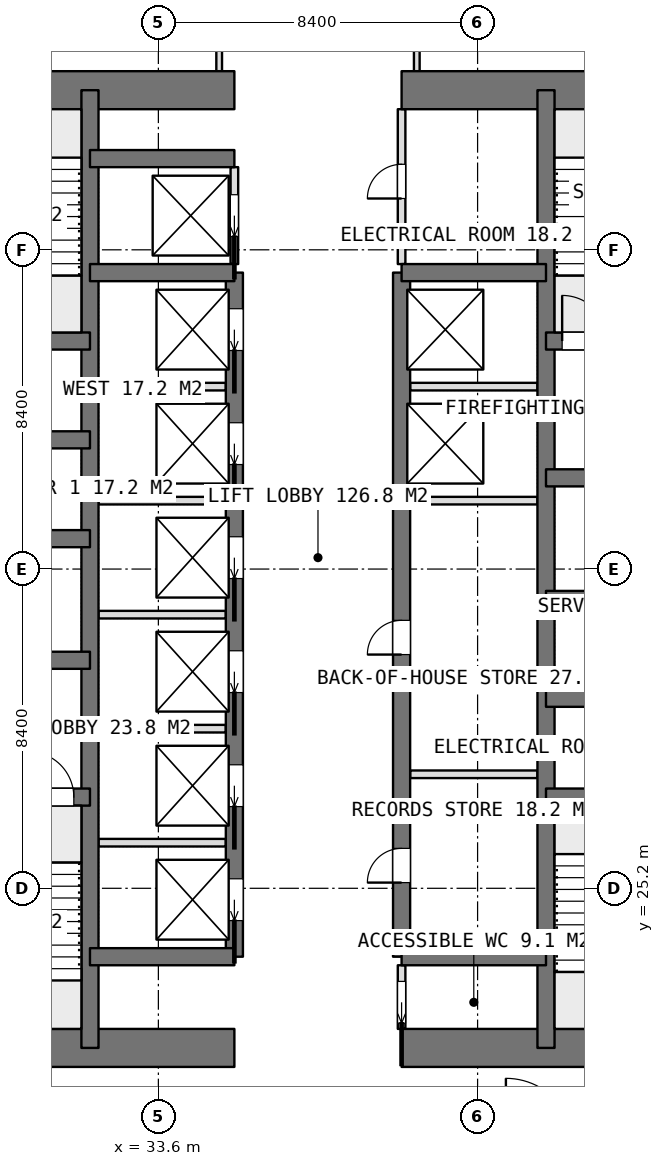
"""IFC4 building model, lengths in metres.
Left out: names, types, materials, properties, quantities, classifications, styles, units other than length and angle.
Written with IfcOpenShell. Run it as: python <this file> out.ifc"""

import sys

from ifc_helpers import new_model, si_unit, direction, frame, frame_2d, origin, place, context, subcontext, project, spatial, rectangle, extrude, element, fill, save


model = new_model("IFC4")
c1 = context("Model", 3, precision=1e-05, world=origin(), true_north=direction((0.0, 1.0)))
c2 = subcontext(c1, "Body", "Model", "MODEL_VIEW")
j1 = project(units=[si_unit("LENGTHUNIT", "METRE"), si_unit("PLANEANGLEUNIT", "RADIAN")], contexts=[c1])
p1 = place(None, origin())
s1 = spatial("IfcSite", under=j1, at=p1, CompositionType="ELEMENT")
p2 = place(p1, origin())
s2 = spatial("IfcBuilding", under=s1, at=p2, CompositionType="ELEMENT")
p3 = place(p2, frame((0.0, 0.0, 217.7)))
s3 = spatial("IfcBuildingStorey", under=s2, at=p3, CompositionType="ELEMENT", Elevation=217.7)
p4 = place(p3, frame((25.2, 21.0, 0.0), z_axis=(0.0, 0.0, 1.0), x_axis=(1.0, 0.0, 0.0)))
e1 = element("IfcWall", 1, at=p4, inside=s3, PredefinedType="SHEAR", context=c2, shape_type="SweptSolid", body=[
    extrude(rectangle(XDim=10.4, YDim=1.0, at=frame_2d((5.2, 0.0))), origin(), (0.0, 0.0, 1.0), 3.75),
])
p5 = place(p3, frame((40.0, 21.0, 0.0), z_axis=(0.0, 0.0, 1.0), x_axis=(1.0, 0.0, 0.0)))
e2 = element("IfcWall", 2, at=p5, inside=s3, PredefinedType="SHEAR", context=c2, shape_type="SweptSolid", body=[
    extrude(rectangle(XDim=10.4, YDim=1.0, at=frame_2d((5.2, 0.0))), origin(), (0.0, 0.0, 1.0), 3.75),
])
p6 = place(p3, frame((25.2, 46.2, 0.0), z_axis=(0.0, 0.0, 1.0), x_axis=(1.0, 0.0, 0.0)))
e3 = element("IfcWall", 3, at=p6, inside=s3, PredefinedType="SHEAR", context=c2, shape_type="SweptSolid", body=[
    extrude(rectangle(XDim=10.4, YDim=1.0, at=frame_2d((5.2, 0.0))), origin(), (0.0, 0.0, 1.0), 3.75),
])
p7 = place(p3, frame((40.0, 46.2, 0.0), z_axis=(0.0, 0.0, 1.0), x_axis=(1.0, 0.0, 0.0)))
e4 = element("IfcWall", 4, at=p7, inside=s3, PredefinedType="SHEAR", context=c2, shape_type="SweptSolid", body=[
    extrude(rectangle(XDim=10.4, YDim=1.0, at=frame_2d((5.2, 0.0))), origin(), (0.0, 0.0, 1.0), 3.75),
])
for number, where, z_axis, x_axis in (
    (5, (31.8, 21.0, 0.0), (0.0, 0.0, 1.0), (0.0, 1.0, 0.0)),
    (6, (43.8, 21.0, 0.0), (0.0, 0.0, 1.0), (0.0, 1.0, 0.0)),
):
    element("IfcWall", number, at=place(p3, frame(where, z_axis=z_axis, x_axis=x_axis)), inside=s3, PredefinedType="SHEAR", context=c2, shape_type="SweptSolid", body=[
        extrude(rectangle(XDim=25.2, YDim=0.45, at=frame_2d((12.6, 0.0))), origin(), (0.0, 0.0, 1.0), 3.75),
    ])
p8 = place(p3, frame((35.6, 23.4, 0.0), z_axis=(0.0, 0.0, 1.0), x_axis=(0.0, 1.0, 0.0)))
e7 = element("IfcWall", 7, at=p8, inside=s3, PredefinedType="SHEAR", context=c2, shape_type="SweptSolid", body=[
    extrude(rectangle(XDim=18.0, YDim=0.45, at=frame_2d((9.0, 0.0))), origin(), (0.0, 0.0, 1.0), 3.75),
])
p9 = place(p8, frame((0.95, 0.0, 0.0)))
e8 = element("IfcOpeningElement", 8, at=p9, cuts=e7, PredefinedType="OPENING", context=c2, shape_type="SweptSolid", body=[
    extrude(rectangle(XDim=1.1, YDim=2.1, at=frame_2d((0.55, 1.05))), frame((0.0, 0.235, 0.0), z_axis=(0.0, -1.0, 0.0), x_axis=(1.0, 0.0, 0.0)), (0.0, 0.0, 1.0), 0.47),
])
p10 = place(p8, frame((3.95, 0.0, 0.0)))
e9 = element("IfcOpeningElement", 9, at=p10, cuts=e7, PredefinedType="OPENING", context=c2, shape_type="SweptSolid", body=[
    extrude(rectangle(XDim=1.1, YDim=2.1, at=frame_2d((0.55, 1.05))), frame((0.0, 0.235, 0.0), z_axis=(0.0, -1.0, 0.0), x_axis=(1.0, 0.0, 0.0)), (0.0, 0.0, 1.0), 0.47),
])
p11 = place(p8, frame((6.95, 0.0, 0.0)))
e10 = element("IfcOpeningElement", 10, at=p11, cuts=e7, PredefinedType="OPENING", context=c2, shape_type="SweptSolid", body=[
    extrude(rectangle(XDim=1.1, YDim=2.1, at=frame_2d((0.55, 1.05))), frame((0.0, 0.235, 0.0), z_axis=(0.0, -1.0, 0.0), x_axis=(1.0, 0.0, 0.0)), (0.0, 0.0, 1.0), 0.47),
])
p12 = place(p8, frame((9.95, 0.0, 0.0)))
e11 = element("IfcOpeningElement", 11, at=p12, cuts=e7, PredefinedType="OPENING", context=c2, shape_type="SweptSolid", body=[
    extrude(rectangle(XDim=1.1, YDim=2.1, at=frame_2d((0.55, 1.05))), frame((0.0, 0.235, 0.0), z_axis=(0.0, -1.0, 0.0), x_axis=(1.0, 0.0, 0.0)), (0.0, 0.0, 1.0), 0.47),
])
p13 = place(p8, frame((12.95, 0.0, 0.0)))
e12 = element("IfcOpeningElement", 12, at=p13, cuts=e7, PredefinedType="OPENING", context=c2, shape_type="SweptSolid", body=[
    extrude(rectangle(XDim=1.1, YDim=2.1, at=frame_2d((0.55, 1.05))), frame((0.0, 0.235, 0.0), z_axis=(0.0, -1.0, 0.0), x_axis=(1.0, 0.0, 0.0)), (0.0, 0.0, 1.0), 0.47),
])
p14 = place(p8, frame((15.95, 0.0, 0.0)))
e13 = element("IfcOpeningElement", 13, at=p14, cuts=e7, PredefinedType="OPENING", context=c2, shape_type="SweptSolid", body=[
    extrude(rectangle(XDim=1.1, YDim=2.1, at=frame_2d((0.55, 1.05))), frame((0.0, 0.235, 0.0), z_axis=(0.0, -1.0, 0.0), x_axis=(1.0, 0.0, 0.0)), (0.0, 0.0, 1.0), 0.47),
])
p15 = place(p3, frame((40.0, 23.4, 0.0), z_axis=(0.0, 0.0, 1.0), x_axis=(0.0, 1.0, 0.0)))
e14 = element("IfcWall", 14, at=p15, inside=s3, PredefinedType="SHEAR", context=c2, shape_type="SweptSolid", body=[
    extrude(rectangle(XDim=18.0, YDim=0.45, at=frame_2d((9.0, 0.0))), origin(), (0.0, 0.0, 1.0), 3.75),
])
p16 = place(p15, frame((1.95, 0.0, 0.0)))
e15 = element("IfcOpeningElement", 15, at=p16, cuts=e14, PredefinedType="OPENING", context=c2, shape_type="SweptSolid", body=[
    extrude(rectangle(XDim=0.9, YDim=2.1, at=frame_2d((0.45, 1.05))), frame((0.0, 0.235, 0.0), z_axis=(0.0, -1.0, 0.0), x_axis=(1.0, 0.0, 0.0)), (0.0, 0.0, 1.0), 0.47),
])
p17 = place(p15, frame((7.95, 0.0, 0.0)))
e16 = element("IfcOpeningElement", 16, at=p17, cuts=e14, PredefinedType="OPENING", context=c2, shape_type="SweptSolid", body=[
    extrude(rectangle(XDim=0.9, YDim=2.1, at=frame_2d((0.45, 1.05))), frame((0.0, 0.235, 0.0), z_axis=(0.0, -1.0, 0.0), x_axis=(1.0, 0.0, 0.0)), (0.0, 0.0, 1.0), 0.47),
])
for number, where, z_axis, x_axis in (
    (17, (31.8, 23.4, 0.0), (0.0, 0.0, 1.0), (1.0, 0.0, 0.0)),
    (18, (31.8, 41.4, 0.0), (0.0, 0.0, 1.0), (1.0, 0.0, 0.0)),
    (19, (31.8, 44.4, 0.0), (0.0, 0.0, 1.0), (1.0, 0.0, 0.0)),
    (20, (40.0, 23.4, 0.0), (0.0, 0.0, 1.0), (1.0, 0.0, 0.0)),
    (21, (40.0, 41.4, 0.0), (0.0, 0.0, 1.0), (1.0, 0.0, 0.0)),
):
    element("IfcWall", number, at=place(p3, frame(where, z_axis=z_axis, x_axis=x_axis)), inside=s3, PredefinedType="SHEAR", context=c2, shape_type="SweptSolid", body=[
        extrude(rectangle(XDim=3.8, YDim=0.45, at=frame_2d((1.9, 0.0))), origin(), (0.0, 0.0, 1.0), 3.75),
    ])
p18 = place(p3, frame((25.2, 27.6, 0.0), z_axis=(0.0, 0.0, 1.0), x_axis=(1.0, 0.0, 0.0)))
e22 = element("IfcWall", 22, at=p18, inside=s3, PredefinedType="SHEAR", context=c2, shape_type="SweptSolid", body=[
    extrude(rectangle(XDim=6.6, YDim=0.45, at=frame_2d((3.3, 0.0))), origin(), (0.0, 0.0, 1.0), 3.75),
])
p19 = place(p18, frame((4.975, 0.0, 0.0)))
e23 = element("IfcOpeningElement", 23, at=p19, cuts=e22, PredefinedType="OPENING", context=c2, shape_type="SweptSolid", body=[
    extrude(rectangle(XDim=1.2, YDim=2.1, at=frame_2d((0.6, 1.05))), frame((0.0, 0.235, 0.0), z_axis=(0.0, -1.0, 0.0), x_axis=(1.0, 0.0, 0.0)), (0.0, 0.0, 1.0), 0.47),
])
p20 = place(p3, frame((25.2, 31.2, 0.0), z_axis=(0.0, 0.0, 1.0), x_axis=(1.0, 0.0, 0.0)))
e24 = element("IfcWall", 24, at=p20, inside=s3, PredefinedType="SHEAR", context=c2, shape_type="SweptSolid", body=[
    extrude(rectangle(XDim=6.6, YDim=0.45, at=frame_2d((3.3, 0.0))), origin(), (0.0, 0.0, 1.0), 3.75),
])
p21 = place(p20, frame((2.65, 0.0, 0.0)))
e25 = element("IfcOpeningElement", 25, at=p21, cuts=e24, PredefinedType="OPENING", context=c2, shape_type="SweptSolid", body=[
    extrude(rectangle(XDim=1.3, YDim=2.1, at=frame_2d((0.65, 1.05))), frame((0.0, 0.235, 0.0), z_axis=(0.0, -1.0, 0.0), x_axis=(1.0, 0.0, 0.0)), (0.0, 0.0, 1.0), 0.47),
])
for number, where, z_axis, x_axis in (
    (26, (25.2, 34.4, 0.0), (0.0, 0.0, 1.0), (1.0, 0.0, 0.0)),
    (27, (25.2, 37.0, 0.0), (0.0, 0.0, 1.0), (1.0, 0.0, 0.0)),
    (28, (25.2, 39.6, 0.0), (0.0, 0.0, 1.0), (1.0, 0.0, 0.0)),
):
    element("IfcWall", number, at=place(p3, frame(where, z_axis=z_axis, x_axis=x_axis)), inside=s3, PredefinedType="SHEAR", context=c2, shape_type="SweptSolid", body=[
        extrude(rectangle(XDim=6.6, YDim=0.45, at=frame_2d((3.3, 0.0))), origin(), (0.0, 0.0, 1.0), 3.75),
    ])
for number, where, z_axis, x_axis in (
    (29, (43.8, 27.6, 0.0), (0.0, 0.0, 1.0), (1.0, 0.0, 0.0)),
    (30, (43.8, 30.2, 0.0), (0.0, 0.0, 1.0), (1.0, 0.0, 0.0)),
    (31, (43.8, 32.8, 0.0), (0.0, 0.0, 1.0), (1.0, 0.0, 0.0)),
):
    element("IfcWall", number, at=place(p3, frame(where, z_axis=z_axis, x_axis=x_axis)), inside=s3, PredefinedType="SHEAR", context=c2, shape_type="SweptSolid", body=[
        extrude(rectangle(XDim=6.6, YDim=0.45, at=frame_2d((3.3, 0.0))), origin(), (0.0, 0.0, 1.0), 3.75),
    ])
p22 = place(p3, frame((43.8, 36.0, 0.0), z_axis=(0.0, 0.0, 1.0), x_axis=(1.0, 0.0, 0.0)))
e32 = element("IfcWall", 32, at=p22, inside=s3, PredefinedType="SHEAR", context=c2, shape_type="SweptSolid", body=[
    extrude(rectangle(XDim=6.6, YDim=0.45, at=frame_2d((3.3, 0.0))), origin(), (0.0, 0.0, 1.0), 3.75),
])
p23 = place(p22, frame((2.65, 0.0, 0.0)))
e33 = element("IfcOpeningElement", 33, at=p23, cuts=e32, PredefinedType="OPENING", context=c2, shape_type="SweptSolid", body=[
    extrude(rectangle(XDim=1.3, YDim=2.1, at=frame_2d((0.65, 1.05))), frame((0.0, 0.235, 0.0), z_axis=(0.0, -1.0, 0.0), x_axis=(1.0, 0.0, 0.0)), (0.0, 0.0, 1.0), 0.47),
])
p24 = place(p3, frame((43.8, 39.6, 0.0), z_axis=(0.0, 0.0, 1.0), x_axis=(1.0, 0.0, 0.0)))
e34 = element("IfcWall", 34, at=p24, inside=s3, PredefinedType="SHEAR", context=c2, shape_type="SweptSolid", body=[
    extrude(rectangle(XDim=6.6, YDim=0.45, at=frame_2d((3.3, 0.0))), origin(), (0.0, 0.0, 1.0), 3.75),
])
p25 = place(p24, frame((0.425, 0.0, 0.0)))
e35 = element("IfcOpeningElement", 35, at=p25, cuts=e34, PredefinedType="OPENING", context=c2, shape_type="SweptSolid", body=[
    extrude(rectangle(XDim=1.2, YDim=2.1, at=frame_2d((0.6, 1.05))), frame((0.0, 0.235, 0.0), z_axis=(0.0, -1.0, 0.0), x_axis=(1.0, 0.0, 0.0)), (0.0, 0.0, 1.0), 0.47),
])
for number, where, z_axis, x_axis in (
    (36, (32.025, 26.4, 0.0), (0.0, 0.0, 1.0), (1.0, 0.0, 0.0)),
    (37, (32.025, 29.4, 0.0), (0.0, 0.0, 1.0), (1.0, 0.0, 0.0)),
    (38, (32.025, 32.4, 0.0), (0.0, 0.0, 1.0), (1.0, 0.0, 0.0)),
    (39, (32.025, 35.4, 0.0), (0.0, 0.0, 1.0), (1.0, 0.0, 0.0)),
    (40, (32.025, 38.4, 0.0), (0.0, 0.0, 1.0), (1.0, 0.0, 0.0)),
):
    element("IfcWall", number, at=place(p3, frame(where, z_axis=z_axis, x_axis=x_axis)), inside=s3, PredefinedType="PARTITIONING", context=c2, shape_type="SweptSolid", body=[
        extrude(rectangle(XDim=3.35, YDim=0.2, at=frame_2d((1.675, 0.0))), origin(), (0.0, 0.0, 1.0), 3.5),
    ])
for number, where, z_axis, x_axis in (
    (41, (40.225, 35.4, 0.0), (0.0, 0.0, 1.0), (1.0, 0.0, 0.0)),
    (42, (40.225, 38.4, 0.0), (0.0, 0.0, 1.0), (1.0, 0.0, 0.0)),
):
    element("IfcWall", number, at=place(p3, frame(where, z_axis=z_axis, x_axis=x_axis)), inside=s3, PredefinedType="PARTITIONING", context=c2, shape_type="SweptSolid", body=[
        extrude(rectangle(XDim=3.35, YDim=0.2, at=frame_2d((1.675, 0.0))), origin(), (0.0, 0.0, 1.0), 3.5),
    ])
p26 = place(p3, frame((40.0, 21.5, 0.0), z_axis=(0.0, 0.0, 1.0), x_axis=(0.0, 1.0, 0.0)))
e43 = element("IfcWall", 43, at=p26, inside=s3, PredefinedType="PARTITIONING", context=c2, shape_type="SweptSolid", body=[
    extrude(rectangle(XDim=1.675, YDim=0.2, at=frame_2d((0.837, 0.0))), origin(), (0.0, 0.0, 1.0), 3.5),
])
p27 = place(p26, frame((0.15, 0.0, 0.0)))
e44 = element("IfcOpeningElement", 44, at=p27, cuts=e43, PredefinedType="OPENING", context=c2, shape_type="SweptSolid", body=[
    extrude(rectangle(XDim=1.1, YDim=2.1, at=frame_2d((0.55, 1.05))), frame((0.0, 0.11, 0.0), z_axis=(0.0, -1.0, 0.0), x_axis=(1.0, 0.0, 0.0)), (0.0, 0.0, 1.0), 0.22),
])
p28 = place(p3, frame((40.0, 41.625, 0.0), z_axis=(0.0, 0.0, 1.0), x_axis=(0.0, 1.0, 0.0)))
e45 = element("IfcWall", 45, at=p28, inside=s3, PredefinedType="PARTITIONING", context=c2, shape_type="SweptSolid", body=[
    extrude(rectangle(XDim=4.075, YDim=0.2, at=frame_2d((2.038, 0.0))), origin(), (0.0, 0.0, 1.0), 3.5),
])
p29 = place(p28, frame((1.725, 0.0, 0.0)))
e46 = element("IfcOpeningElement", 46, at=p29, cuts=e45, PredefinedType="OPENING", context=c2, shape_type="SweptSolid", body=[
    extrude(rectangle(XDim=0.9, YDim=2.1, at=frame_2d((0.45, 1.05))), frame((0.0, 0.11, 0.0), z_axis=(0.0, -1.0, 0.0), x_axis=(1.0, 0.0, 0.0)), (0.0, 0.0, 1.0), 0.22),
])
p30 = place(p3, frame((35.6, 41.625, 0.0), z_axis=(0.0, 0.0, 1.0), x_axis=(0.0, 1.0, 0.0)))
e47 = element("IfcWall", 47, at=p30, inside=s3, PredefinedType="PARTITIONING", context=c2, shape_type="SweptSolid", body=[
    extrude(rectangle(XDim=2.55, YDim=0.2, at=frame_2d((1.275, 0.0))), origin(), (0.0, 0.0, 1.0), 3.5),
])
p31 = place(p30, frame((0.725, 0.0, 0.0)))
e48 = element("IfcOpeningElement", 48, at=p31, cuts=e47, PredefinedType="OPENING", context=c2, shape_type="SweptSolid", body=[
    extrude(rectangle(XDim=1.1, YDim=2.1, at=frame_2d((0.55, 1.05))), frame((0.0, 0.11, 0.0), z_axis=(0.0, -1.0, 0.0), x_axis=(1.0, 0.0, 0.0)), (0.0, 0.0, 1.0), 0.22),
])
p32 = place(p3, frame((40.225, 28.2, 0.0), z_axis=(0.0, 0.0, 1.0), x_axis=(1.0, 0.0, 0.0)))
e49 = element("IfcWall", 49, at=p32, inside=s3, PredefinedType="PARTITIONING", context=c2, shape_type="SweptSolid", body=[
    extrude(rectangle(XDim=3.35, YDim=0.2, at=frame_2d((1.675, 0.0))), origin(), (0.0, 0.0, 1.0), 3.5),
])
for number, where, z_axis, x_axis in (
    (50, (40.4, 46.7, 0.0), (0.0, 0.0, 1.0), (0.0, 1.0, 0.0)),
    (51, (35.2, 46.7, 0.0), (0.0, 0.0, 1.0), (0.0, 1.0, 0.0)),
):
    element("IfcWall", number, at=place(p3, frame(where, z_axis=z_axis, x_axis=x_axis)), inside=s3, PredefinedType="PARTITIONING", context=c2, shape_type="SweptSolid", body=[
        extrude(rectangle(XDim=2.625, YDim=0.15, at=frame_2d((1.312, 0.0))), origin(), (0.0, 0.0, 1.0), 3.5),
    ])
p33 = place(p27, origin())
e52 = element("IfcDoor", 52, at=p33, inside=s3, OperationType="SLIDING_TO_LEFT", PredefinedType="DOOR", context=c2, shape_type="SweptSolid", body=[
    extrude(rectangle(XDim=1.1, YDim=2.1, at=frame_2d((0.55, 1.05))), frame((0.0, 0.025, 0.0), z_axis=(0.0, -1.0, 0.0), x_axis=(1.0, 0.0, 0.0)), (0.0, 0.0, 1.0), 0.05),
])
fill(e44, e52)
p34 = place(p29, origin())
e53 = element("IfcDoor", 53, at=p34, inside=s3, OperationType="SINGLE_SWING_LEFT", PredefinedType="DOOR", context=c2, shape_type="SweptSolid", body=[
    extrude(rectangle(XDim=0.9, YDim=2.1, at=frame_2d((0.45, 1.05))), frame((0.0, 0.025, 0.0), z_axis=(0.0, -1.0, 0.0), x_axis=(1.0, 0.0, 0.0)), (0.0, 0.0, 1.0), 0.05),
])
fill(e46, e53)
p35 = place(p16, origin())
e54 = element("IfcDoor", 54, at=p35, inside=s3, OperationType="SINGLE_SWING_LEFT", PredefinedType="DOOR", context=c2, shape_type="SweptSolid", body=[
    extrude(rectangle(XDim=0.9, YDim=2.1, at=frame_2d((0.45, 1.05))), frame((0.0, 0.025, 0.0), z_axis=(0.0, -1.0, 0.0), x_axis=(1.0, 0.0, 0.0)), (0.0, 0.0, 1.0), 0.05),
])
fill(e15, e54)
p36 = place(p17, origin())
e55 = element("IfcDoor", 55, at=p36, inside=s3, OperationType="SINGLE_SWING_LEFT", PredefinedType="DOOR", context=c2, shape_type="SweptSolid", body=[
    extrude(rectangle(XDim=0.9, YDim=2.1, at=frame_2d((0.45, 1.05))), frame((0.0, 0.025, 0.0), z_axis=(0.0, -1.0, 0.0), x_axis=(1.0, 0.0, 0.0)), (0.0, 0.0, 1.0), 0.05),
])
fill(e16, e55)
p37 = place(p9, origin())
e56 = element("IfcDoor", 56, at=p37, inside=s3, OperationType="SLIDING_TO_LEFT", PredefinedType="USERDEFINED", context=c2, shape_type="SweptSolid", body=[
    extrude(rectangle(XDim=1.1, YDim=2.1, at=frame_2d((0.55, 1.05))), frame((0.0, 0.025, 0.0), z_axis=(0.0, -1.0, 0.0), x_axis=(1.0, 0.0, 0.0)), (0.0, 0.0, 1.0), 0.05),
])
fill(e8, e56)
p38 = place(p10, origin())
e57 = element("IfcDoor", 57, at=p38, inside=s3, OperationType="SLIDING_TO_LEFT", PredefinedType="USERDEFINED", context=c2, shape_type="SweptSolid", body=[
    extrude(rectangle(XDim=1.1, YDim=2.1, at=frame_2d((0.55, 1.05))), frame((0.0, 0.025, 0.0), z_axis=(0.0, -1.0, 0.0), x_axis=(1.0, 0.0, 0.0)), (0.0, 0.0, 1.0), 0.05),
])
fill(e9, e57)
p39 = place(p11, origin())
e58 = element("IfcDoor", 58, at=p39, inside=s3, OperationType="SLIDING_TO_LEFT", PredefinedType="USERDEFINED", context=c2, shape_type="SweptSolid", body=[
    extrude(rectangle(XDim=1.1, YDim=2.1, at=frame_2d((0.55, 1.05))), frame((0.0, 0.025, 0.0), z_axis=(0.0, -1.0, 0.0), x_axis=(1.0, 0.0, 0.0)), (0.0, 0.0, 1.0), 0.05),
])
fill(e10, e58)
p40 = place(p12, origin())
e59 = element("IfcDoor", 59, at=p40, inside=s3, OperationType="SLIDING_TO_LEFT", PredefinedType="USERDEFINED", context=c2, shape_type="SweptSolid", body=[
    extrude(rectangle(XDim=1.1, YDim=2.1, at=frame_2d((0.55, 1.05))), frame((0.0, 0.025, 0.0), z_axis=(0.0, -1.0, 0.0), x_axis=(1.0, 0.0, 0.0)), (0.0, 0.0, 1.0), 0.05),
])
fill(e11, e59)
p41 = place(p13, origin())
e60 = element("IfcDoor", 60, at=p41, inside=s3, OperationType="SLIDING_TO_LEFT", PredefinedType="USERDEFINED", context=c2, shape_type="SweptSolid", body=[
    extrude(rectangle(XDim=1.1, YDim=2.1, at=frame_2d((0.55, 1.05))), frame((0.0, 0.025, 0.0), z_axis=(0.0, -1.0, 0.0), x_axis=(1.0, 0.0, 0.0)), (0.0, 0.0, 1.0), 0.05),
])
fill(e12, e60)
p42 = place(p14, origin())
e61 = element("IfcDoor", 61, at=p42, inside=s3, OperationType="SLIDING_TO_LEFT", PredefinedType="USERDEFINED", context=c2, shape_type="SweptSolid", body=[
    extrude(rectangle(XDim=1.1, YDim=2.1, at=frame_2d((0.55, 1.05))), frame((0.0, 0.025, 0.0), z_axis=(0.0, -1.0, 0.0), x_axis=(1.0, 0.0, 0.0)), (0.0, 0.0, 1.0), 0.05),
])
fill(e13, e61)
p43 = place(p31, origin())
e62 = element("IfcDoor", 62, at=p43, inside=s3, OperationType="SLIDING_TO_LEFT", PredefinedType="USERDEFINED", context=c2, shape_type="SweptSolid", body=[
    extrude(rectangle(XDim=1.1, YDim=2.1, at=frame_2d((0.55, 1.05))), frame((0.0, 0.025, 0.0), z_axis=(0.0, -1.0, 0.0), x_axis=(1.0, 0.0, 0.0)), (0.0, 0.0, 1.0), 0.05),
])
fill(e48, e62)
p44 = place(p19, origin())
e63 = element("IfcDoor", 63, at=p44, inside=s3, OperationType="SINGLE_SWING_RIGHT", PredefinedType="DOOR", context=c2, shape_type="SweptSolid", body=[
    extrude(rectangle(XDim=1.2, YDim=2.1, at=frame_2d((0.6, 1.05))), frame((0.0, 0.025, 0.0), z_axis=(0.0, -1.0, 0.0), x_axis=(1.0, 0.0, 0.0)), (0.0, 0.0, 1.0), 0.05),
])
fill(e23, e63)
p45 = place(p25, origin())
e64 = element("IfcDoor", 64, at=p45, inside=s3, OperationType="SINGLE_SWING_RIGHT", PredefinedType="DOOR", context=c2, shape_type="SweptSolid", body=[
    extrude(rectangle(XDim=1.2, YDim=2.1, at=frame_2d((0.6, 1.05))), frame((0.0, 0.025, 0.0), z_axis=(0.0, -1.0, 0.0), x_axis=(1.0, 0.0, 0.0)), (0.0, 0.0, 1.0), 0.05),
])
fill(e35, e64)
save(model, sys.argv[1])
